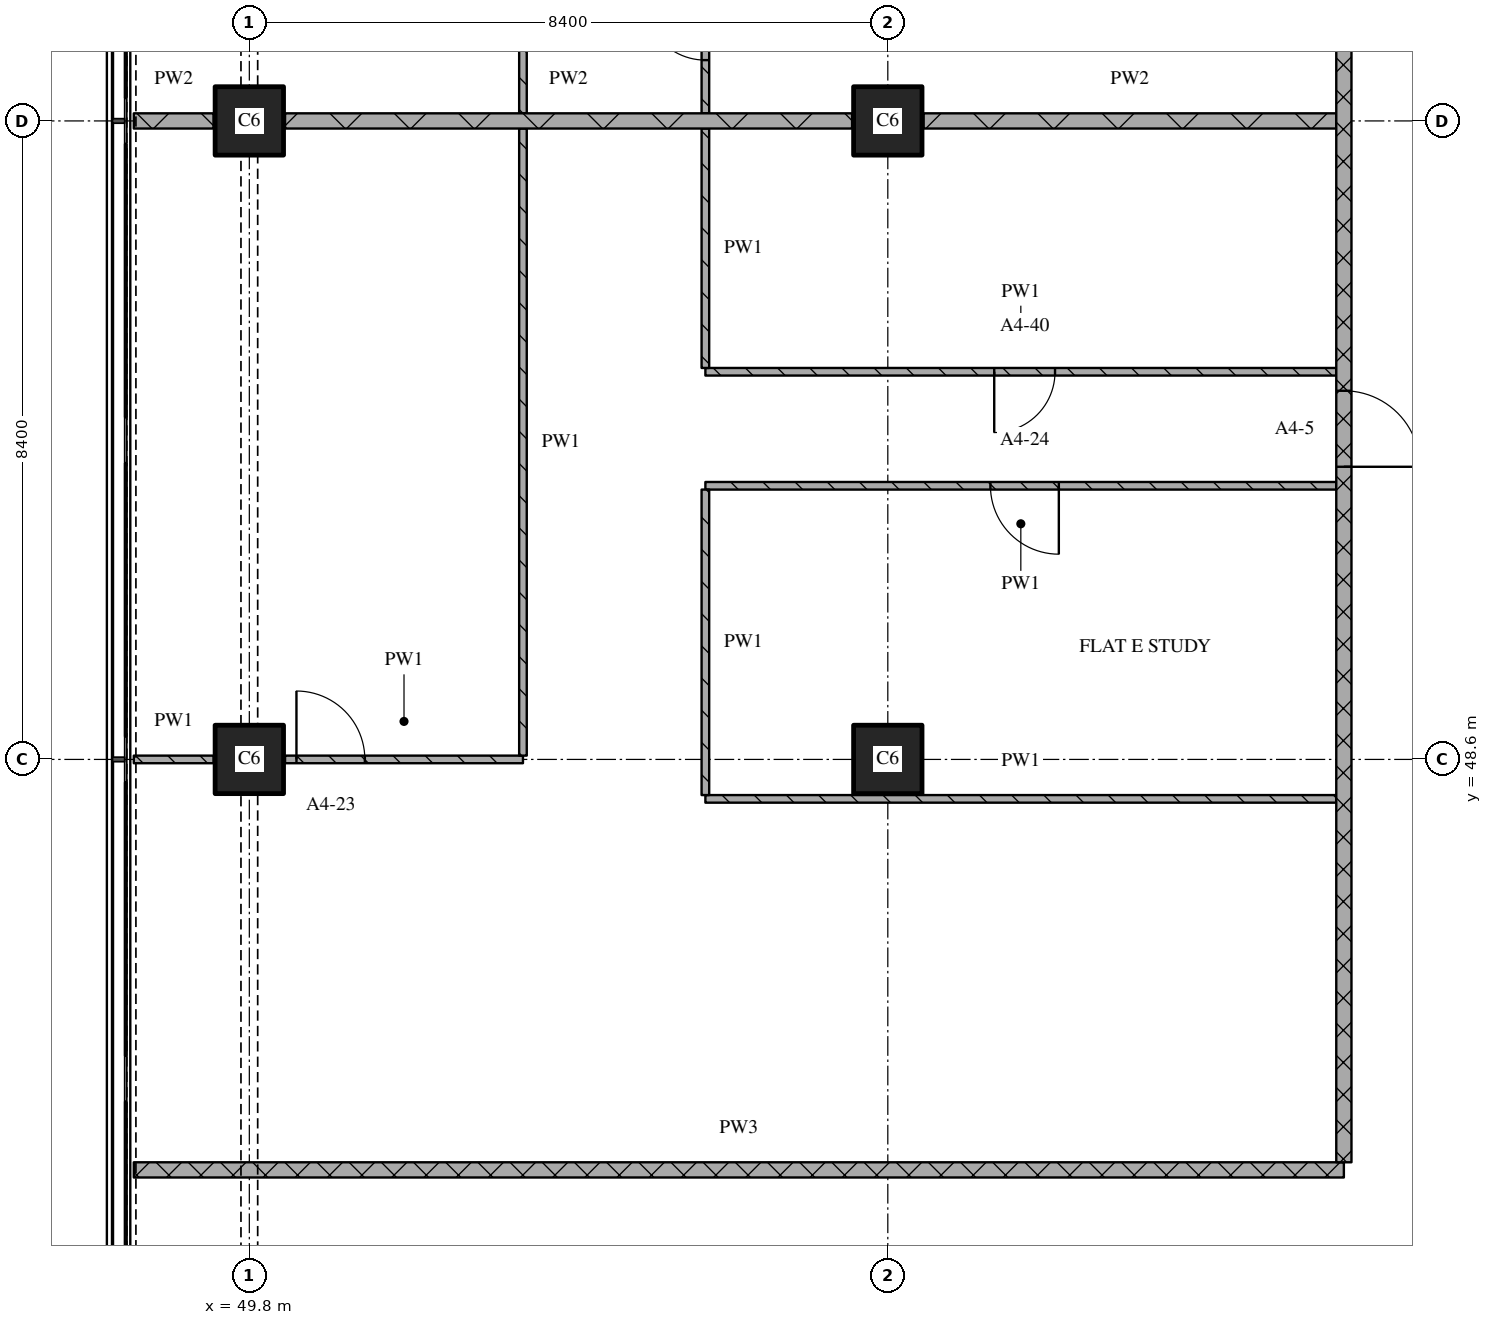
"""IFC4 building model, lengths in metres.
Left out: names, types, materials, properties, quantities, classifications, styles, units other than length and angle.
Written with IfcOpenShell. Run it as: python <this file> out.ifc"""

import sys

from ifc_helpers import new_model, si_unit, direction, frame, frame_2d, origin, origin_2d, place, context, subcontext, project, spatial, rectangle, extrude, element, fill, save


model = new_model("IFC4")
c1 = context("Model", 3, precision=1e-05, world=origin(), true_north=direction((0.0, 1.0)))
c2 = subcontext(c1, "Body", "Model", "MODEL_VIEW")
j1 = project(units=[si_unit("LENGTHUNIT", "METRE"), si_unit("PLANEANGLEUNIT", "RADIAN")], contexts=[c1])
p1 = place(None, origin())
s1 = spatial("IfcSite", under=j1, at=p1, CompositionType="ELEMENT")
p2 = place(p1, origin())
s2 = spatial("IfcBuilding", under=s1, at=p2, CompositionType="ELEMENT")
p3 = place(p2, frame((0.0, 0.0, 76.8)))
s3 = spatial("IfcBuildingStorey", under=s2, at=p3, CompositionType="ELEMENT", Elevation=76.8)
for number, where, z_axis, x_axis in (
    (1, (49.8, 48.6, 0.0), (0.0, 0.0, 1.0), (1.0, 0.0, 0.0)),
    (2, (49.8, 57.0, 0.0), (0.0, 0.0, 1.0), (1.0, 0.0, 0.0)),
    (3, (58.2, 48.6, 0.0), (0.0, 0.0, 1.0), (1.0, 0.0, 0.0)),
    (4, (58.2, 57.0, 0.0), (0.0, 0.0, 1.0), (1.0, 0.0, 0.0)),
):
    element("IfcColumn", number, at=place(p3, frame(where, z_axis=z_axis, x_axis=x_axis)), inside=s3, PredefinedType="COLUMN", context=c2, shape_type="SweptSolid", body=[
        extrude(rectangle(XDim=0.9, YDim=0.9, at=origin_2d()), origin(), (0.0, 0.0, 1.0), 3.6),
    ])
p4 = place(p3, frame((48.28, 43.2, 0.0), z_axis=(0.0, 0.0, 1.0), x_axis=(1.0, 0.0, 0.0)))
e5 = element("IfcWall", 5, at=p4, inside=s3, PredefinedType="PARTITIONING", context=c2, shape_type="SweptSolid", body=[
    extrude(rectangle(XDim=15.92, YDim=0.2, at=frame_2d((7.96, 0.0))), origin(), (0.0, 0.0, 1.0), 3.32),
])
p5 = place(p3, frame((55.8, 48.081, 0.0), z_axis=(0.0, 0.0, 1.0), x_axis=(1.0, 0.0, 0.0)))
e6 = element("IfcWall", 6, at=p5, inside=s3, PredefinedType="PARTITIONING", context=c2, shape_type="SweptSolid", body=[
    extrude(rectangle(XDim=8.3, YDim=0.1, at=frame_2d((4.15, 0.0))), origin(), (0.0, 0.0, 1.0), 3.32),
])
p6 = place(p3, frame((48.28, 48.6, 0.0), z_axis=(0.0, 0.0, 1.0), x_axis=(1.0, 0.0, 0.0)))
e7 = element("IfcWall", 7, at=p6, inside=s3, PredefinedType="PARTITIONING", context=c2, shape_type="SweptSolid", body=[
    extrude(rectangle(XDim=1.05, YDim=0.1, at=frame_2d((0.525, 0.0))), origin(), (0.0, 0.0, 1.0), 3.32),
])
p7 = place(p3, frame((50.27, 48.6, 0.0), z_axis=(0.0, 0.0, 1.0), x_axis=(1.0, 0.0, 0.0)))
e8 = element("IfcWall", 8, at=p7, inside=s3, PredefinedType="PARTITIONING", context=c2, shape_type="SweptSolid", body=[
    extrude(rectangle(XDim=3.13, YDim=0.1, at=frame_2d((1.565, 0.0))), origin(), (0.0, 0.0, 1.0), 3.32),
])
p8 = place(p7, frame((0.15, 0.0, 0.0)))
e9 = element("IfcOpeningElement", 9, at=p8, cuts=e8, PredefinedType="OPENING", context=c2, shape_type="SweptSolid", body=[
    extrude(rectangle(XDim=0.9, YDim=2.1, at=frame_2d((0.45, 1.05))), frame((0.0, 0.06, 0.0), z_axis=(0.0, -1.0, 0.0), x_axis=(1.0, 0.0, 0.0)), (0.0, 0.0, 1.0), 0.12),
])
p9 = place(p3, frame((64.1, 52.2, 0.0), z_axis=(0.0, 0.0, 1.0), x_axis=(-1.0, 0.0, 0.0)))
e10 = element("IfcWall", 10, at=p9, inside=s3, PredefinedType="PARTITIONING", context=c2, shape_type="SweptSolid", body=[
    extrude(rectangle(XDim=8.3, YDim=0.1, at=frame_2d((4.15, 0.0))), origin(), (0.0, 0.0, 1.0), 3.32),
])
p10 = place(p9, frame((3.65, 0.0, 0.0)))
e11 = element("IfcOpeningElement", 11, at=p10, cuts=e10, PredefinedType="OPENING", context=c2, shape_type="SweptSolid", body=[
    extrude(rectangle(XDim=0.9, YDim=2.1, at=frame_2d((0.45, 1.05))), frame((0.0, 0.06, 0.0), z_axis=(0.0, -1.0, 0.0), x_axis=(1.0, 0.0, 0.0)), (0.0, 0.0, 1.0), 0.12),
])
p11 = place(p3, frame((55.8, 53.7, 0.0), z_axis=(0.0, 0.0, 1.0), x_axis=(1.0, 0.0, 0.0)))
e12 = element("IfcWall", 12, at=p11, inside=s3, PredefinedType="PARTITIONING", context=c2, shape_type="SweptSolid", body=[
    extrude(rectangle(XDim=8.3, YDim=0.1, at=frame_2d((4.15, 0.0))), origin(), (0.0, 0.0, 1.0), 3.32),
])
p12 = place(p11, frame((3.8, 0.0, 0.0)))
e13 = element("IfcOpeningElement", 13, at=p12, cuts=e12, PredefinedType="OPENING", context=c2, shape_type="SweptSolid", body=[
    extrude(rectangle(XDim=0.8, YDim=2.1, at=frame_2d((0.4, 1.05))), frame((0.0, 0.06, 0.0), z_axis=(0.0, -1.0, 0.0), x_axis=(1.0, 0.0, 0.0)), (0.0, 0.0, 1.0), 0.12),
])
p13 = place(p3, frame((48.28, 57.0, 0.0), z_axis=(0.0, 0.0, 1.0), x_axis=(1.0, 0.0, 0.0)))
e14 = element("IfcWall", 14, at=p13, inside=s3, PredefinedType="PARTITIONING", context=c2, shape_type="SweptSolid", body=[
    extrude(rectangle(XDim=1.05, YDim=0.2, at=frame_2d((0.525, 0.0))), origin(), (0.0, 0.0, 1.0), 3.32),
])
p14 = place(p3, frame((50.27, 57.0, 0.0), z_axis=(0.0, 0.0, 1.0), x_axis=(1.0, 0.0, 0.0)))
e15 = element("IfcWall", 15, at=p14, inside=s3, PredefinedType="PARTITIONING", context=c2, shape_type="SweptSolid", body=[
    extrude(rectangle(XDim=7.46, YDim=0.2, at=frame_2d((3.73, 0.0))), origin(), (0.0, 0.0, 1.0), 3.32),
])
p15 = place(p3, frame((58.67, 57.0, 0.0), z_axis=(0.0, 0.0, 1.0), x_axis=(1.0, 0.0, 0.0)))
e16 = element("IfcWall", 16, at=p15, inside=s3, PredefinedType="PARTITIONING", context=c2, shape_type="SweptSolid", body=[
    extrude(rectangle(XDim=5.43, YDim=0.2, at=frame_2d((2.715, 0.0))), origin(), (0.0, 0.0, 1.0), 3.32),
])
p16 = place(p3, frame((55.8, 52.15, 0.0), z_axis=(0.0, 0.0, 1.0), x_axis=(0.0, -1.0, 0.0)))
e17 = element("IfcWall", 17, at=p16, inside=s3, PredefinedType="PARTITIONING", context=c2, shape_type="SweptSolid", body=[
    extrude(rectangle(XDim=4.019, YDim=0.1, at=frame_2d((2.009, 0.0))), origin(), (0.0, 0.0, 1.0), 3.32),
])
p17 = place(p3, frame((64.2, 43.3, 0.0), z_axis=(0.0, 0.0, 1.0), x_axis=(0.0, 1.0, 0.0)))
e18 = element("IfcWall", 18, at=p17, inside=s3, PredefinedType="PARTITIONING", context=c2, shape_type="SweptSolid", body=[
    extrude(rectangle(XDim=32.02, YDim=0.2, at=frame_2d((16.01, 0.0))), origin(), (0.0, 0.0, 1.0), 3.32),
])
p18 = place(p17, frame((9.15, 0.0, 0.0)))
e19 = element("IfcOpeningElement", 19, at=p18, cuts=e18, PredefinedType="OPENING", context=c2, shape_type="SweptSolid", body=[
    extrude(rectangle(XDim=1.0, YDim=2.1, at=frame_2d((0.5, 1.05))), frame((0.0, 0.11, 0.0), z_axis=(0.0, -1.0, 0.0), x_axis=(1.0, 0.0, 0.0)), (0.0, 0.0, 1.0), 0.22),
])
p19 = place(p17, frame((18.45, 0.0, 0.0)))
e20 = element("IfcOpeningElement", 20, at=p19, cuts=e18, PredefinedType="OPENING", context=c2, shape_type="SweptSolid", body=[
    extrude(rectangle(XDim=1.0, YDim=2.1, at=frame_2d((0.5, 1.05))), frame((0.0, 0.11, 0.0), z_axis=(0.0, -1.0, 0.0), x_axis=(1.0, 0.0, 0.0)), (0.0, 0.0, 1.0), 0.22),
])
for number, where, z_axis, x_axis in (
    (21, (53.4, 56.9, 0.0), (0.0, 0.0, 1.0), (0.0, -1.0, 0.0)),
    (22, (53.4, 65.35, 0.0), (0.0, 0.0, 1.0), (0.0, -1.0, 0.0)),
):
    element("IfcWall", number, at=place(p3, frame(where, z_axis=z_axis, x_axis=x_axis)), inside=s3, PredefinedType="PARTITIONING", context=c2, shape_type="SweptSolid", body=[
        extrude(rectangle(XDim=8.25, YDim=0.1, at=frame_2d((4.125, 0.0))), origin(), (0.0, 0.0, 1.0), 3.32),
    ])
p20 = place(p3, frame((55.8, 56.9, 0.0), z_axis=(0.0, 0.0, 1.0), x_axis=(0.0, -1.0, 0.0)))
e23 = element("IfcWall", 23, at=p20, inside=s3, PredefinedType="PARTITIONING", context=c2, shape_type="SweptSolid", body=[
    extrude(rectangle(XDim=3.15, YDim=0.1, at=frame_2d((1.575, 0.0))), origin(), (0.0, 0.0, 1.0), 3.32),
])
p21 = place(p3, frame((55.8, 61.45, 0.0), z_axis=(0.0, 0.0, 1.0), x_axis=(0.0, -1.0, 0.0)))
e24 = element("IfcWall", 24, at=p21, inside=s3, PredefinedType="PARTITIONING", context=c2, shape_type="SweptSolid", body=[
    extrude(rectangle(XDim=4.35, YDim=0.1, at=frame_2d((2.175, 0.0))), origin(), (0.0, 0.0, 1.0), 3.32),
])
p22 = place(p21, frame((2.85, 0.0, 0.0)))
e25 = element("IfcOpeningElement", 25, at=p22, cuts=e24, PredefinedType="OPENING", context=c2, shape_type="SweptSolid", body=[
    extrude(rectangle(XDim=0.8, YDim=2.1, at=frame_2d((0.4, 1.05))), frame((0.0, 0.06, 0.0), z_axis=(0.0, -1.0, 0.0), x_axis=(1.0, 0.0, 0.0)), (0.0, 0.0, 1.0), 0.12),
])
p23 = place(p8, origin())
e26 = element("IfcDoor", 26, at=p23, inside=s3, OperationType="SINGLE_SWING_LEFT", PredefinedType="DOOR", context=c2, shape_type="SweptSolid", body=[
    extrude(rectangle(XDim=0.9, YDim=2.1, at=frame_2d((0.45, 1.05))), frame((0.0, 0.025, 0.0), z_axis=(0.0, -1.0, 0.0), x_axis=(1.0, 0.0, 0.0)), (0.0, 0.0, 1.0), 0.05),
])
fill(e9, e26)
p24 = place(p10, origin())
e27 = element("IfcDoor", 27, at=p24, inside=s3, OperationType="SINGLE_SWING_LEFT", PredefinedType="DOOR", context=c2, shape_type="SweptSolid", body=[
    extrude(rectangle(XDim=0.9, YDim=2.1, at=frame_2d((0.45, 1.05))), frame((0.0, 0.025, 0.0), z_axis=(0.0, -1.0, 0.0), x_axis=(1.0, 0.0, 0.0)), (0.0, 0.0, 1.0), 0.05),
])
fill(e11, e27)
p25 = place(p12, origin())
e28 = element("IfcDoor", 28, at=p25, inside=s3, OperationType="SINGLE_SWING_RIGHT", PredefinedType="DOOR", context=c2, shape_type="SweptSolid", body=[
    extrude(rectangle(XDim=0.8, YDim=2.1, at=frame_2d((0.4, 1.05))), frame((0.0, 0.025, 0.0), z_axis=(0.0, -1.0, 0.0), x_axis=(1.0, 0.0, 0.0)), (0.0, 0.0, 1.0), 0.05),
])
fill(e13, e28)
p26 = place(p18, origin())
e29 = element("IfcDoor", 29, at=p26, inside=s3, OperationType="SINGLE_SWING_RIGHT", PredefinedType="DOOR", context=c2, shape_type="SweptSolid", body=[
    extrude(rectangle(XDim=1.0, YDim=2.1, at=frame_2d((0.5, 1.05))), frame((0.0, 0.025, 0.0), z_axis=(0.0, -1.0, 0.0), x_axis=(1.0, 0.0, 0.0)), (0.0, 0.0, 1.0), 0.05),
])
fill(e19, e29)
p27 = place(p22, origin())
e30 = element("IfcDoor", 30, at=p27, inside=s3, OperationType="SINGLE_SWING_RIGHT", PredefinedType="DOOR", context=c2, shape_type="SweptSolid", body=[
    extrude(rectangle(XDim=0.8, YDim=2.1, at=frame_2d((0.4, 1.05))), frame((0.0, 0.025, 0.0), z_axis=(0.0, -1.0, 0.0), x_axis=(1.0, 0.0, 0.0)), (0.0, 0.0, 1.0), 0.05),
])
fill(e25, e30)
save(model, sys.argv[1])
